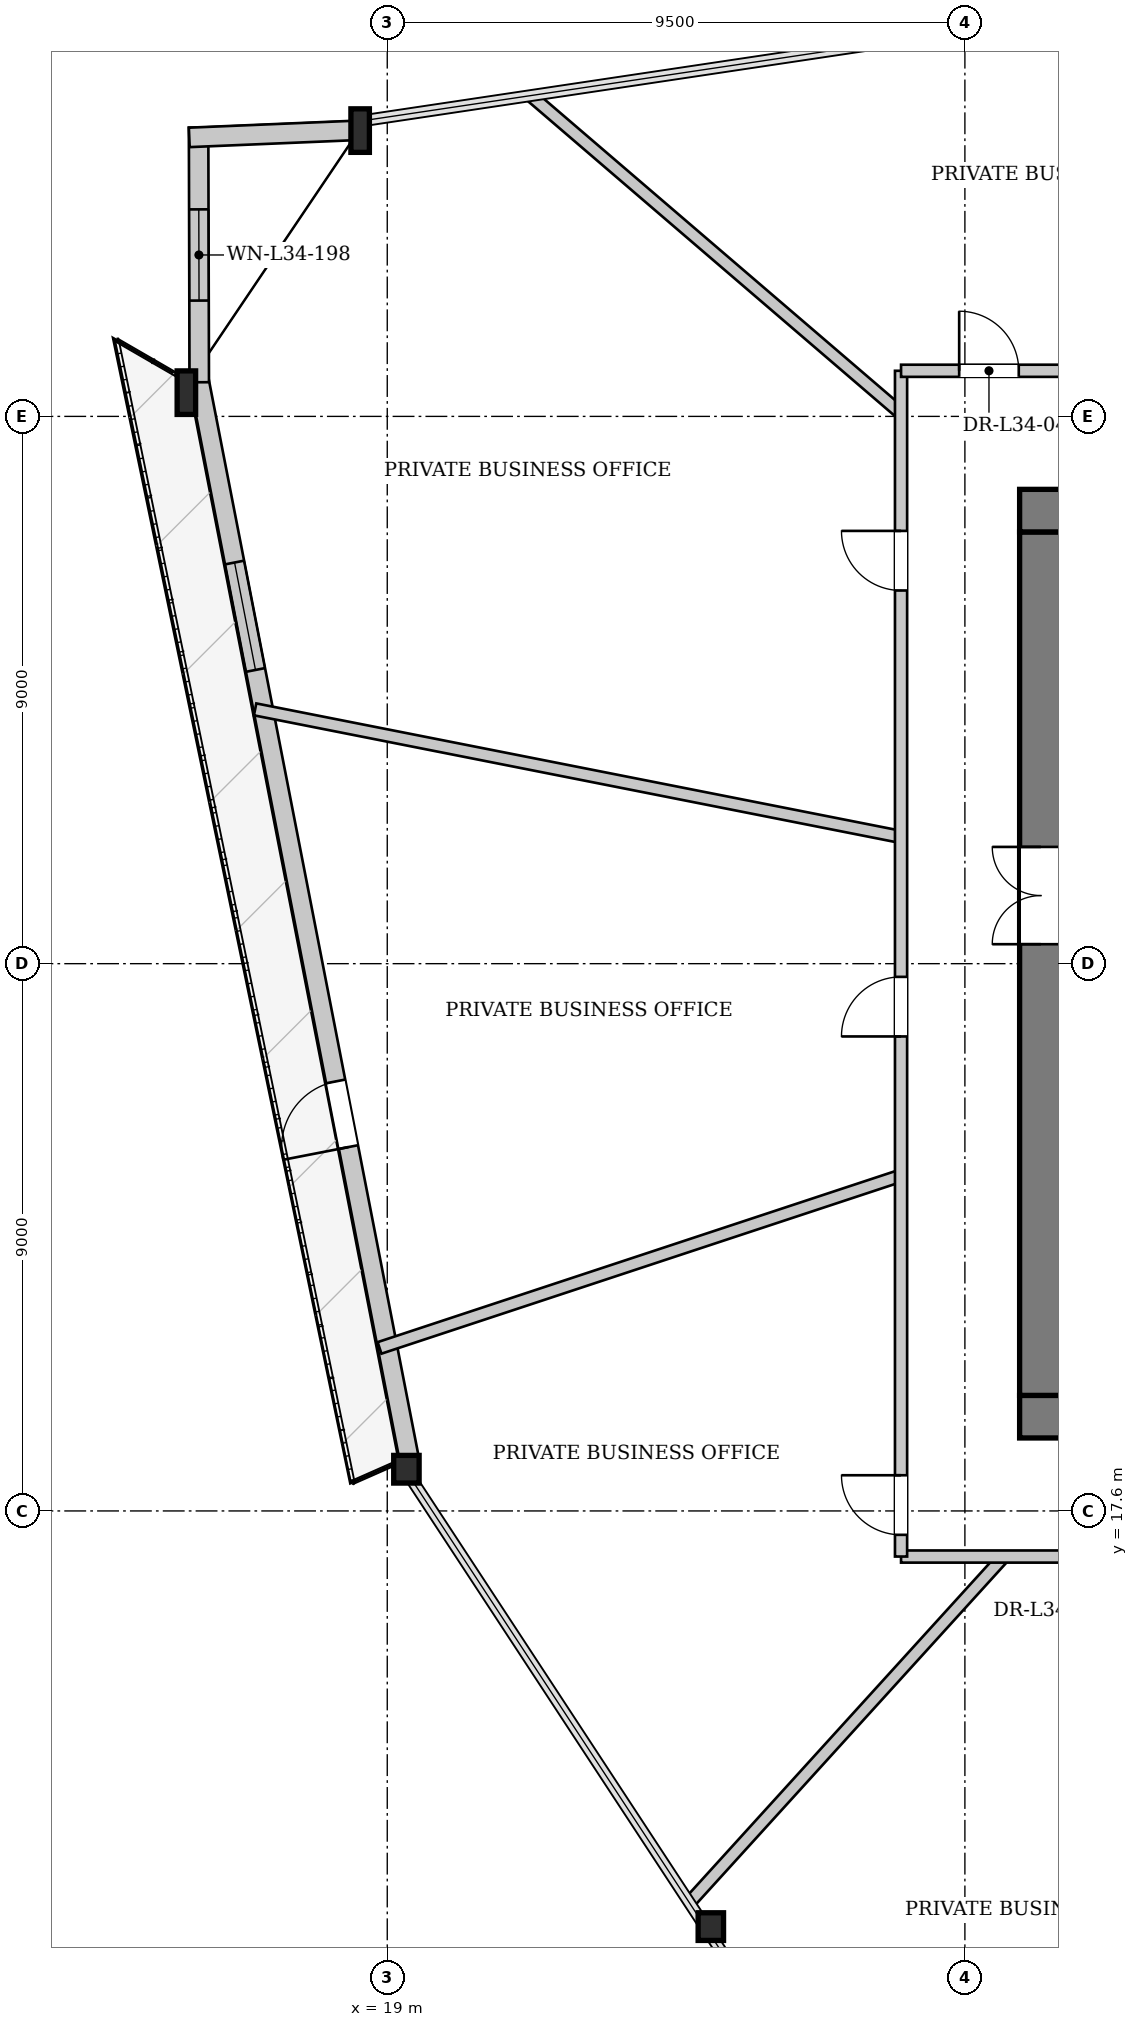
"""IFC4 building model, lengths in metres.
Left out: names, types, materials, properties, quantities, classifications, styles, units other than length and angle.
Written with IfcOpenShell. Run it as: python <this file> out.ifc"""

import sys

from ifc_helpers import new_model, si_unit, direction, frame, frame_2d, origin, origin_2d, place, context, subcontext, project, spatial, rectangle, i_section, extrude, source, transform, mapped, element, fill, save


model = new_model("IFC4")
c1 = context("Model", 3, precision=1e-05, world=origin(), true_north=direction((0.0, 1.0)))
c2 = subcontext(c1, "Body", "Model", "MODEL_VIEW")
j1 = project(units=[si_unit("LENGTHUNIT", "METRE"), si_unit("PLANEANGLEUNIT", "RADIAN")], contexts=[c1])
p1 = place(None, origin())
s1 = spatial("IfcSite", under=j1, at=p1, CompositionType="ELEMENT")
p2 = place(p1, origin())
s2 = spatial("IfcBuilding", under=s1, at=p2, CompositionType="ELEMENT")
p3 = place(p2, frame((0.0, 0.0, 130.55)))
s3 = spatial("IfcBuildingStorey", under=s2, at=p3, CompositionType="ELEMENT", Elevation=130.55)
m1 = source(origin(), c2, "Body", "SweptSolid", [
    extrude(i_section(OverallWidth=0.304, OverallDepth=0.716, WebThickness=0.021, FlangeThickness=0.04, at=origin_2d()), origin(), (0.0, 0.0, 1.0), 3.408),
])
p4 = place(p3, frame((18.654, 40.471, 0.0), z_axis=(-0.058813141151, -0.100147102715, 0.993232889229), x_axis=(0.862298686328, -0.506400015361, 0.0)))
e1 = element("IfcColumn", 1, at=p4, inside=s3, PredefinedType="COLUMN", context=c2, shape_type="MappedRepresentation", body=[
    mapped(m1, transform((0.0, 0.0, 0.0), x_axis=(1.0, 0.0, 0.0), y_axis=(0.0, 1.0, 0.0), z_axis=(0.0, 0.0, 1.0), scale=1.0)),
])
m2 = source(origin(), c2, "Body", "SweptSolid", [
    extrude(i_section(OverallWidth=0.304, OverallDepth=0.716, WebThickness=0.021, FlangeThickness=0.04, at=origin_2d()), origin(), (0.0, 0.0, 1.0), 3.404),
])
p5 = place(p3, frame((15.748, 36.161, 0.0), z_axis=(-0.030412031227, -0.10034535775, 0.994487766408), x_axis=(0.957012897048, -0.29004536694, 0.0)))
e2 = element("IfcColumn", 2, at=p5, inside=s3, PredefinedType="COLUMN", context=c2, shape_type="MappedRepresentation", body=[
    mapped(m2, transform((0.0, 0.0, 0.0), x_axis=(1.0, 0.0, 0.0), y_axis=(0.0, 1.0, 0.0), z_axis=(0.0, 0.0, 1.0), scale=1.0)),
])
m3 = source(origin(), c2, "Body", "SweptSolid", [
    extrude(i_section(OverallWidth=0.418, OverallDepth=0.455, WebThickness=0.038, FlangeThickness=0.059, at=origin_2d()), origin(), (0.0, 0.0, 1.0), 3.402),
])
p6 = place(p3, frame((19.206, 18.414, 0.0), z_axis=(0.063876758213, -0.075288448725, 0.995113766988), x_axis=(0.762530868569, 0.646951833199, 0.0)))
e3 = element("IfcColumn", 3, at=p6, inside=s3, PredefinedType="COLUMN", context=c2, shape_type="MappedRepresentation", body=[
    mapped(m3, transform((0.0, 0.0, 0.0), x_axis=(1.0, 0.0, 0.0), y_axis=(0.0, 1.0, 0.0), z_axis=(0.0, 0.0, 1.0), scale=1.0)),
])
m4 = source(origin(), c2, "Body", "SweptSolid", [
    extrude(i_section(OverallWidth=0.418, OverallDepth=0.455, WebThickness=0.038, FlangeThickness=0.059, at=origin_2d()), origin(), (0.0, 0.0, 1.0), 3.404),
])
p7 = place(p3, frame((24.167, 10.855, 0.0), z_axis=(0.091084690741, -0.05357501101, 0.994400974109), x_axis=(0.50699046576, 0.861951662002, 0.0)))
e4 = element("IfcColumn", 4, at=p7, inside=s3, PredefinedType="COLUMN", context=c2, shape_type="MappedRepresentation", body=[
    mapped(m4, transform((0.0, 0.0, 0.0), x_axis=(1.0, 0.0, 0.0), y_axis=(0.0, 1.0, 0.0), z_axis=(0.0, 0.0, 1.0), scale=1.0)),
])
p8 = place(p3, frame((19.363, 18.444, 0.0), z_axis=(0.0, 0.0, 1.0), x_axis=(-0.191260679824, 0.98153927703, 0.0)))
e5 = element("IfcWall", 5, at=p8, inside=s3, PredefinedType="SOLIDWALL", context=c2, shape_type="SweptSolid", body=[
    extrude(rectangle(XDim=18.081, YDim=0.32, at=frame_2d((9.041, 0.0))), origin(), (0.0, 0.0, 1.0), 2.692),
])
p9 = place(p8, frame((5.236, 0.0, 0.0)))
e6 = element("IfcOpeningElement", 6, at=p9, cuts=e5, PredefinedType="OPENING", context=c2, shape_type="SweptSolid", body=[
    extrude(rectangle(XDim=1.1, YDim=2.3, at=frame_2d((0.55, 1.15))), frame((0.0, 0.17, 0.0), z_axis=(0.0, -1.0, 0.0), x_axis=(1.0, 0.0, 0.0)), (0.0, 0.0, 1.0), 0.34),
])
p10 = place(p8, frame((13.23, 0.0, 0.372)))
e7 = element("IfcOpeningElement", 7, at=p10, cuts=e5, PredefinedType="OPENING", context=c2, shape_type="SweptSolid", body=[
    extrude(rectangle(XDim=1.8, YDim=2.2, at=frame_2d((0.9, 1.1))), frame((0.0, 0.17, 0.0), z_axis=(0.0, -1.0, 0.0), x_axis=(1.0, 0.0, 0.0)), (0.0, 0.0, 1.0), 0.34),
])
p11 = place(p3, frame((15.908, 36.162, 0.0), z_axis=(0.0, 0.0, 1.0), x_axis=(-0.002565738829, 0.999996708487, 0.0)))
e8 = element("IfcWall", 8, at=p11, inside=s3, PredefinedType="SOLIDWALL", context=c2, shape_type="SweptSolid", body=[
    extrude(rectangle(XDim=4.187, YDim=0.32, at=frame_2d((2.093, 0.0))), origin(), (0.0, 0.0, 1.0), 2.692),
])
p12 = place(p11, frame((1.343, 0.0, 0.272)))
e9 = element("IfcOpeningElement", 9, at=p12, cuts=e8, PredefinedType="OPENING", context=c2, shape_type="SweptSolid", body=[
    extrude(rectangle(XDim=1.5, YDim=2.3, at=frame_2d((0.75, 1.15))), frame((0.0, 0.17, 0.0), z_axis=(0.0, -1.0, 0.0), x_axis=(1.0, 0.0, 0.0)), (0.0, 0.0, 1.0), 0.34),
])
p13 = place(p3, frame((15.744, 40.188, 0.0), z_axis=(0.0, 0.0, 1.0), x_axis=(0.99911515718, 0.042058324886, 0.0)))
e10 = element("IfcWall", 10, at=p13, inside=s3, PredefinedType="SOLIDWALL", context=c2, shape_type="SweptSolid", body=[
    extrude(rectangle(XDim=2.92, YDim=0.32, at=frame_2d((1.46, 0.0))), origin(), (0.0, 0.0, 1.0), 2.692),
])
p14 = place(p3, frame((46.6, 19.15, 0.0), z_axis=(0.0, 0.0, 1.0), x_axis=(-1.0, 0.0, 0.0)))
e11 = element("IfcWall", 11, at=p14, inside=s3, PredefinedType="SHEAR", context=c2, shape_type="SweptSolid", body=[
    extrude(rectangle(XDim=17.2, YDim=0.7, at=frame_2d((8.6, 0.0))), origin(), (0.0, 0.0, 1.0), 3.3),
])
p15 = place(p14, frame((4.8, 0.0, 0.0)))
e12 = element("IfcOpeningElement", 12, at=p15, cuts=e11, PredefinedType="OPENING", context=c2, shape_type="SweptSolid", body=[
    extrude(rectangle(XDim=1.12, YDim=2.25, at=frame_2d((0.56, 1.125))), frame((0.0, 0.36, 0.0), z_axis=(0.0, -1.0, 0.0), x_axis=(1.0, 0.0, 0.0)), (0.0, 0.0, 1.0), 0.72),
])
p16 = place(p14, frame((11.3, 0.0, 0.0)))
e13 = element("IfcOpeningElement", 13, at=p16, cuts=e11, PredefinedType="OPENING", context=c2, shape_type="SweptSolid", body=[
    extrude(rectangle(XDim=1.12, YDim=2.25, at=frame_2d((0.56, 1.125))), frame((0.0, 0.36, 0.0), z_axis=(0.0, -1.0, 0.0), x_axis=(1.0, 0.0, 0.0)), (0.0, 0.0, 1.0), 0.72),
])
p17 = place(p3, frame((29.75, 19.5, 0.0), z_axis=(0.0, 0.0, 1.0), x_axis=(0.0, 1.0, 0.0)))
e14 = element("IfcWall", 14, at=p17, inside=s3, PredefinedType="SHEAR", context=c2, shape_type="SweptSolid", body=[
    extrude(rectangle(XDim=14.2, YDim=0.7, at=frame_2d((7.1, 0.0))), origin(), (0.0, 0.0, 1.0), 3.3),
])
p18 = place(p17, frame((7.42, 0.0, 0.0)))
e15 = element("IfcOpeningElement", 15, at=p18, cuts=e14, PredefinedType="OPENING", context=c2, shape_type="SweptSolid", body=[
    extrude(rectangle(XDim=1.6, YDim=2.2, at=frame_2d((0.8, 1.1))), frame((0.0, 0.36, 0.0), z_axis=(0.0, -1.0, 0.0), x_axis=(1.0, 0.0, 0.0)), (0.0, 0.0, 1.0), 0.72),
])
p19 = place(p3, frame((29.4, 34.05, 0.0), z_axis=(0.0, 0.0, 1.0), x_axis=(1.0, 0.0, 0.0)))
e16 = element("IfcWall", 16, at=p19, inside=s3, PredefinedType="SHEAR", context=c2, shape_type="SweptSolid", body=[
    extrude(rectangle(XDim=17.2, YDim=0.7, at=frame_2d((8.6, 0.0))), origin(), (0.0, 0.0, 1.0), 3.3),
])
p20 = place(p19, frame((1.7, 0.0, 0.0)))
e17 = element("IfcOpeningElement", 17, at=p20, cuts=e16, PredefinedType="OPENING", context=c2, shape_type="SweptSolid", body=[
    extrude(rectangle(XDim=0.95, YDim=2.1, at=frame_2d((0.475, 1.05))), frame((0.0, 0.36, 0.0), z_axis=(0.0, -1.0, 0.0), x_axis=(1.0, 0.0, 0.0)), (0.0, 0.0, 1.0), 0.72),
])
p21 = place(p19, frame((4.08, 0.0, 0.0)))
e18 = element("IfcOpeningElement", 18, at=p21, cuts=e16, PredefinedType="OPENING", context=c2, shape_type="SweptSolid", body=[
    extrude(rectangle(XDim=1.32, YDim=2.2, at=frame_2d((0.66, 1.1))), frame((0.0, 0.36, 0.0), z_axis=(0.0, -1.0, 0.0), x_axis=(1.0, 0.0, 0.0)), (0.0, 0.0, 1.0), 0.72),
])
p22 = place(p19, frame((15.15, 0.0, 0.0)))
e19 = element("IfcOpeningElement", 19, at=p22, cuts=e16, PredefinedType="OPENING", context=c2, shape_type="SweptSolid", body=[
    extrude(rectangle(XDim=0.95, YDim=2.1, at=frame_2d((0.475, 1.05))), frame((0.0, 0.36, 0.0), z_axis=(0.0, -1.0, 0.0), x_axis=(1.0, 0.0, 0.0)), (0.0, 0.0, 1.0), 0.72),
])
p23 = place(p3, frame((27.45, 35.651, 0.0), z_axis=(0.0, 0.0, 1.0), x_axis=(-0.75895865216, 0.651138821075, 0.0)))
e20 = element("IfcWall", 20, at=p23, inside=s3, PredefinedType="PARTITIONING", context=c2, shape_type="SweptSolid", body=[
    extrude(rectangle(XDim=7.984, YDim=0.2, at=frame_2d((3.992, 0.0))), origin(), (0.0, 0.0, 1.0), 3.3),
])
p24 = place(p3, frame((27.45, 28.684, 0.0), z_axis=(0.0, 0.0, 1.0), x_axis=(-0.981043583448, 0.19378722191, 0.0)))
e21 = element("IfcWall", 21, at=p24, inside=s3, PredefinedType="PARTITIONING", context=c2, shape_type="SweptSolid", body=[
    extrude(rectangle(XDim=10.828, YDim=0.2, at=frame_2d((5.414, 0.0))), origin(), (0.0, 0.0, 1.0), 3.3),
])
p25 = place(p3, frame((27.45, 23.115, 0.0), z_axis=(0.0, 0.0, 1.0), x_axis=(-0.949525884305, -0.313688691277, 0.0)))
e22 = element("IfcWall", 22, at=p25, inside=s3, PredefinedType="PARTITIONING", context=c2, shape_type="SweptSolid", body=[
    extrude(rectangle(XDim=9.033, YDim=0.2, at=frame_2d((4.516, 0.0))), origin(), (0.0, 0.0, 1.0), 3.3),
])
p26 = place(p3, frame((29.139, 16.85, 0.0), z_axis=(0.0, 0.0, 1.0), x_axis=(-0.672544271628, -0.74005689153, 0.0)))
e23 = element("IfcWall", 23, at=p26, inside=s3, PredefinedType="PARTITIONING", context=c2, shape_type="SweptSolid", body=[
    extrude(rectangle(XDim=7.659, YDim=0.2, at=frame_2d((3.83, 0.0))), origin(), (0.0, 0.0, 1.0), 3.3),
])
p27 = place(p3, frame((27.45, 16.85, 0.0), z_axis=(0.0, 0.0, 1.0), x_axis=(1.0, 0.0, 0.0)))
e24 = element("IfcWall", 24, at=p27, inside=s3, PredefinedType="PARTITIONING", context=c2, shape_type="SweptSolid", body=[
    extrude(rectangle(XDim=21.1, YDim=0.2, at=frame_2d((10.55, 0.0))), origin(), (0.0, 0.0, 1.0), 3.3),
])
p28 = place(p27, frame((2.724, 0.0, 0.0)))
e25 = element("IfcOpeningElement", 25, at=p28, cuts=e24, PredefinedType="OPENING", context=c2, shape_type="SweptSolid", body=[
    extrude(rectangle(XDim=0.98, YDim=2.15, at=frame_2d((0.49, 1.075))), frame((0.0, 0.11, 0.0), z_axis=(0.0, -1.0, 0.0), x_axis=(1.0, 0.0, 0.0)), (0.0, 0.0, 1.0), 0.22),
])
p29 = place(p27, frame((9.581, 0.0, 0.0)))
e26 = element("IfcOpeningElement", 26, at=p29, cuts=e24, PredefinedType="OPENING", context=c2, shape_type="SweptSolid", body=[
    extrude(rectangle(XDim=0.98, YDim=2.15, at=frame_2d((0.49, 1.075))), frame((0.0, 0.11, 0.0), z_axis=(0.0, -1.0, 0.0), x_axis=(1.0, 0.0, 0.0)), (0.0, 0.0, 1.0), 0.22),
])
p30 = place(p27, frame((16.293, 0.0, 0.0)))
e27 = element("IfcOpeningElement", 27, at=p30, cuts=e24, PredefinedType="OPENING", context=c2, shape_type="SweptSolid", body=[
    extrude(rectangle(XDim=0.98, YDim=2.15, at=frame_2d((0.49, 1.075))), frame((0.0, 0.11, 0.0), z_axis=(0.0, -1.0, 0.0), x_axis=(1.0, 0.0, 0.0)), (0.0, 0.0, 1.0), 0.22),
])
p31 = place(p3, frame((27.45, 16.85, 0.0), z_axis=(0.0, 0.0, 1.0), x_axis=(0.0, 1.0, 0.0)))
e28 = element("IfcWall", 28, at=p31, inside=s3, PredefinedType="PARTITIONING", context=c2, shape_type="SweptSolid", body=[
    extrude(rectangle(XDim=19.5, YDim=0.2, at=frame_2d((9.75, 0.0))), origin(), (0.0, 0.0, 1.0), 3.3),
])
p32 = place(p31, frame((15.887, 0.0, 0.0)))
e29 = element("IfcOpeningElement", 29, at=p32, cuts=e28, PredefinedType="OPENING", context=c2, shape_type="SweptSolid", body=[
    extrude(rectangle(XDim=0.98, YDim=2.15, at=frame_2d((0.49, 1.075))), frame((0.0, 0.11, 0.0), z_axis=(0.0, -1.0, 0.0), x_axis=(1.0, 0.0, 0.0)), (0.0, 0.0, 1.0), 0.22),
])
p33 = place(p31, frame((8.553, 0.0, 0.0)))
e30 = element("IfcOpeningElement", 30, at=p33, cuts=e28, PredefinedType="OPENING", context=c2, shape_type="SweptSolid", body=[
    extrude(rectangle(XDim=0.98, YDim=2.15, at=frame_2d((0.49, 1.075))), frame((0.0, 0.11, 0.0), z_axis=(0.0, -1.0, 0.0), x_axis=(1.0, 0.0, 0.0)), (0.0, 0.0, 1.0), 0.22),
])
p34 = place(p31, frame((0.357, 0.0, 0.0)))
e31 = element("IfcOpeningElement", 31, at=p34, cuts=e28, PredefinedType="OPENING", context=c2, shape_type="SweptSolid", body=[
    extrude(rectangle(XDim=0.98, YDim=2.15, at=frame_2d((0.49, 1.075))), frame((0.0, 0.11, 0.0), z_axis=(0.0, -1.0, 0.0), x_axis=(1.0, 0.0, 0.0)), (0.0, 0.0, 1.0), 0.22),
])
p35 = place(p3, frame((27.45, 36.35, 0.0), z_axis=(0.0, 0.0, 1.0), x_axis=(1.0, 0.0, 0.0)))
e32 = element("IfcWall", 32, at=p35, inside=s3, PredefinedType="PARTITIONING", context=c2, shape_type="SweptSolid", body=[
    extrude(rectangle(XDim=21.1, YDim=0.2, at=frame_2d((10.55, 0.0))), origin(), (0.0, 0.0, 1.0), 3.3),
])
p36 = place(p35, frame((19.82, 0.0, 0.0)))
e33 = element("IfcOpeningElement", 33, at=p36, cuts=e32, PredefinedType="OPENING", context=c2, shape_type="SweptSolid", body=[
    extrude(rectangle(XDim=0.98, YDim=2.15, at=frame_2d((0.49, 1.075))), frame((0.0, 0.11, 0.0), z_axis=(0.0, -1.0, 0.0), x_axis=(1.0, 0.0, 0.0)), (0.0, 0.0, 1.0), 0.22),
])
p37 = place(p35, frame((16.269, 0.0, 0.0)))
e34 = element("IfcOpeningElement", 34, at=p37, cuts=e32, PredefinedType="OPENING", context=c2, shape_type="SweptSolid", body=[
    extrude(rectangle(XDim=0.98, YDim=2.15, at=frame_2d((0.49, 1.075))), frame((0.0, 0.11, 0.0), z_axis=(0.0, -1.0, 0.0), x_axis=(1.0, 0.0, 0.0)), (0.0, 0.0, 1.0), 0.22),
])
p38 = place(p35, frame((8.824, 0.0, 0.0)))
e35 = element("IfcOpeningElement", 35, at=p38, cuts=e32, PredefinedType="OPENING", context=c2, shape_type="SweptSolid", body=[
    extrude(rectangle(XDim=0.98, YDim=2.15, at=frame_2d((0.49, 1.075))), frame((0.0, 0.11, 0.0), z_axis=(0.0, -1.0, 0.0), x_axis=(1.0, 0.0, 0.0)), (0.0, 0.0, 1.0), 0.22),
])
p39 = place(p35, frame((0.956, 0.0, 0.0)))
e36 = element("IfcOpeningElement", 36, at=p39, cuts=e32, PredefinedType="OPENING", context=c2, shape_type="SweptSolid", body=[
    extrude(rectangle(XDim=0.98, YDim=2.15, at=frame_2d((0.49, 1.075))), frame((0.0, 0.11, 0.0), z_axis=(0.0, -1.0, 0.0), x_axis=(1.0, 0.0, 0.0)), (0.0, 0.0, 1.0), 0.22),
])
m5 = source(origin(), c2, "Body", "SweptSolid", [
    extrude(rectangle(XDim=1.1, YDim=2.3, at=frame_2d((0.55, 1.15))), frame((0.0, 0.025, 0.0), z_axis=(0.0, -1.0, 0.0), x_axis=(1.0, 0.0, 0.0)), (0.0, 0.0, 1.0), 0.05),
])
p40 = place(p9, origin())
e37 = element("IfcDoor", 37, at=p40, inside=s3, OperationType="SINGLE_SWING_LEFT", PredefinedType="DOOR", context=c2, shape_type="MappedRepresentation", body=[
    mapped(m5, transform((0.0, 0.0, 0.0), x_axis=(1.0, 0.0, 0.0), y_axis=(0.0, 1.0, 0.0), z_axis=(0.0, 0.0, 1.0), scale=1.0)),
])
fill(e6, e37)
m6 = source(origin(), c2, "Body", "SweptSolid", [
    extrude(rectangle(XDim=1.8, YDim=2.2, at=frame_2d((0.9, 1.1))), frame((0.0, 0.03, 0.0), z_axis=(0.0, -1.0, 0.0), x_axis=(1.0, 0.0, 0.0)), (0.0, 0.0, 1.0), 0.06),
])
p41 = place(p10, origin())
e38 = element("IfcWindow", 38, at=p41, inside=s3, PartitioningType="SINGLE_PANEL", PredefinedType="WINDOW", context=c2, shape_type="MappedRepresentation", body=[
    mapped(m6, transform((0.0, 0.0, 0.0), x_axis=(1.0, 0.0, 0.0), y_axis=(0.0, 1.0, 0.0), z_axis=(0.0, 0.0, 1.0), scale=1.0)),
])
fill(e7, e38)
m7 = source(origin(), c2, "Body", "SweptSolid", [
    extrude(rectangle(XDim=1.5, YDim=2.3, at=frame_2d((0.75, 1.15))), frame((0.0, 0.03, 0.0), z_axis=(0.0, -1.0, 0.0), x_axis=(1.0, 0.0, 0.0)), (0.0, 0.0, 1.0), 0.06),
])
p42 = place(p12, origin())
e39 = element("IfcWindow", 39, at=p42, inside=s3, PartitioningType="SINGLE_PANEL", PredefinedType="WINDOW", context=c2, shape_type="MappedRepresentation", body=[
    mapped(m7, transform((0.0, 0.0, 0.0), x_axis=(1.0, 0.0, 0.0), y_axis=(0.0, 1.0, 0.0), z_axis=(0.0, 0.0, 1.0), scale=1.0)),
])
fill(e9, e39)
m8 = source(origin(), c2, "Body", "SweptSolid", [
    extrude(rectangle(XDim=1.6, YDim=2.2, at=frame_2d((0.8, 1.1))), frame((0.0, 0.025, 0.0), z_axis=(0.0, -1.0, 0.0), x_axis=(1.0, 0.0, 0.0)), (0.0, 0.0, 1.0), 0.05),
])
p43 = place(p18, origin())
e40 = element("IfcDoor", 40, at=p43, inside=s3, OperationType="DOUBLE_DOOR_SINGLE_SWING", PredefinedType="DOOR", context=c2, shape_type="MappedRepresentation", body=[
    mapped(m8, transform((0.0, 0.0, 0.0), x_axis=(1.0, 0.0, 0.0), y_axis=(0.0, 1.0, 0.0), z_axis=(0.0, 0.0, 1.0), scale=1.0)),
])
fill(e15, e40)
m9 = source(origin(), c2, "Body", "SweptSolid", [
    extrude(rectangle(XDim=0.98, YDim=2.15, at=frame_2d((0.49, 1.075))), frame((0.0, 0.025, 0.0), z_axis=(0.0, -1.0, 0.0), x_axis=(1.0, 0.0, 0.0)), (0.0, 0.0, 1.0), 0.05),
])
p44 = place(p32, origin())
e41 = element("IfcDoor", 41, at=p44, inside=s3, OperationType="SINGLE_SWING_RIGHT", PredefinedType="DOOR", context=c2, shape_type="MappedRepresentation", body=[
    mapped(m9, transform((0.0, 0.0, 0.0), x_axis=(1.0, 0.0, 0.0), y_axis=(0.0, 1.0, 0.0), z_axis=(0.0, 0.0, 1.0), scale=1.0)),
])
fill(e29, e41)
p45 = place(p33, origin())
e42 = element("IfcDoor", 42, at=p45, inside=s3, OperationType="SINGLE_SWING_LEFT", PredefinedType="DOOR", context=c2, shape_type="MappedRepresentation", body=[
    mapped(m9, transform((0.0, 0.0, 0.0), x_axis=(1.0, 0.0, 0.0), y_axis=(0.0, 1.0, 0.0), z_axis=(0.0, 0.0, 1.0), scale=1.0)),
])
fill(e30, e42)
p46 = place(p34, origin())
e43 = element("IfcDoor", 43, at=p46, inside=s3, OperationType="SINGLE_SWING_RIGHT", PredefinedType="DOOR", context=c2, shape_type="MappedRepresentation", body=[
    mapped(m9, transform((0.0, 0.0, 0.0), x_axis=(1.0, 0.0, 0.0), y_axis=(0.0, 1.0, 0.0), z_axis=(0.0, 0.0, 1.0), scale=1.0)),
])
fill(e31, e43)
p47 = place(p39, origin())
e44 = element("IfcDoor", 44, at=p47, inside=s3, OperationType="SINGLE_SWING_LEFT", PredefinedType="DOOR", context=c2, shape_type="MappedRepresentation", body=[
    mapped(m9, transform((0.0, 0.0, 0.0), x_axis=(1.0, 0.0, 0.0), y_axis=(0.0, 1.0, 0.0), z_axis=(0.0, 0.0, 1.0), scale=1.0)),
])
fill(e36, e44)
save(model, sys.argv[1])
